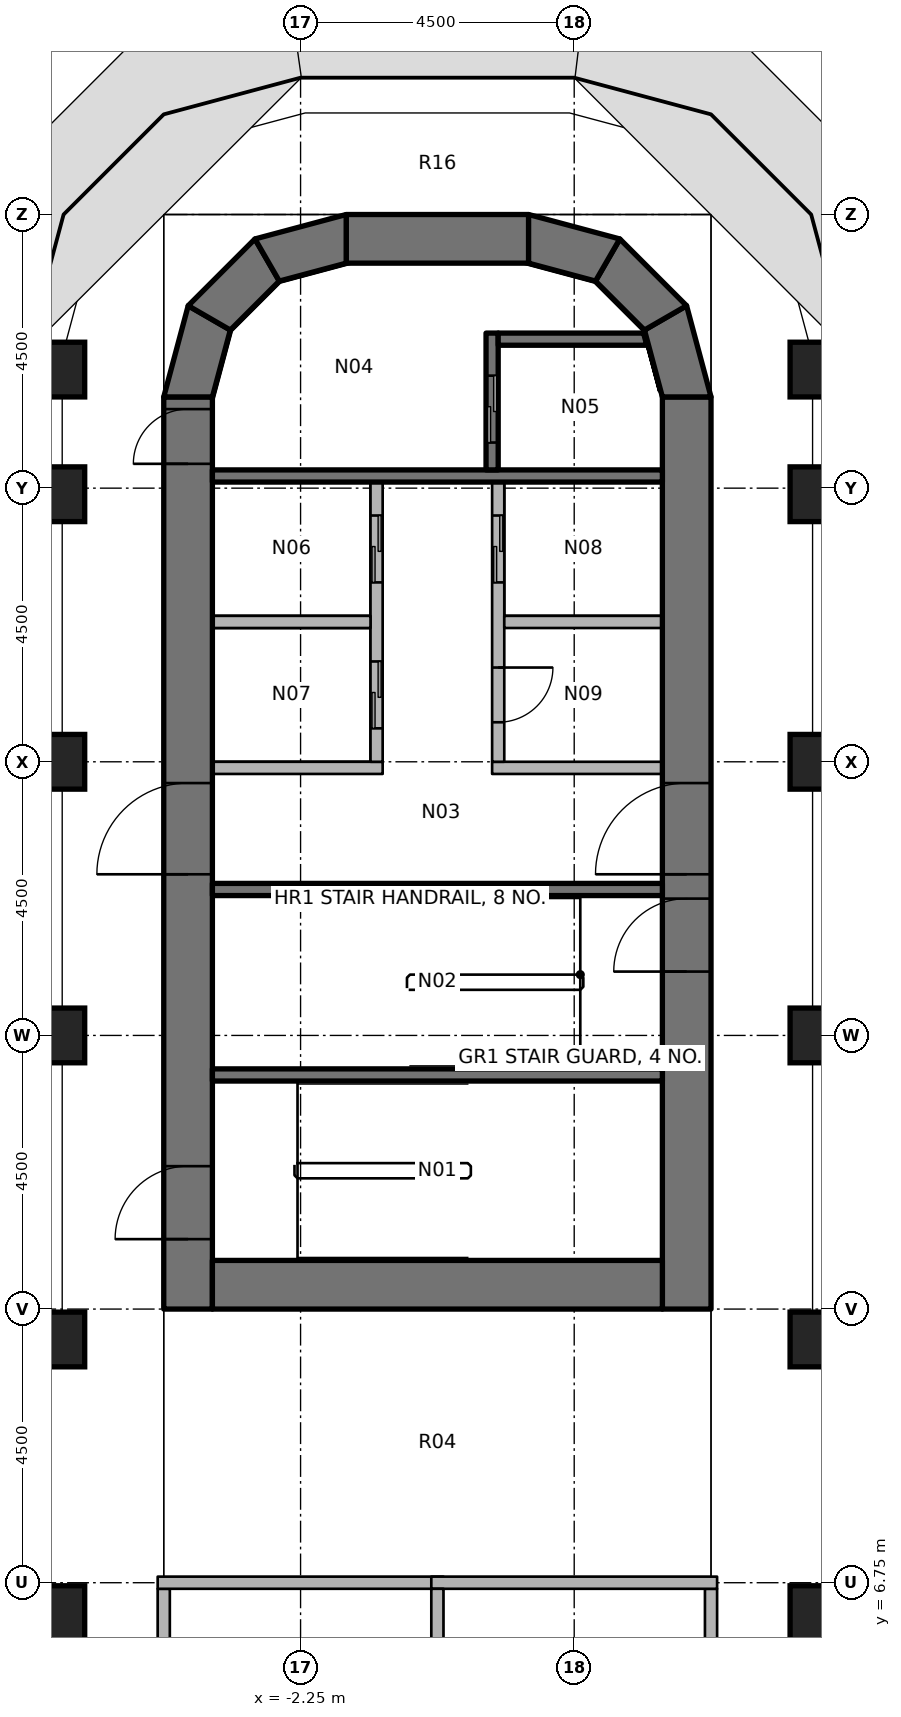
"""IFC4 building model, lengths in metres.
Left out: names, types, materials, properties, quantities, classifications, styles, units other than length and angle.
Written with IfcOpenShell. Run it as: python <this file> out.ifc"""

import sys

from ifc_helpers import new_model, si_unit, direction, frame, frame_2d, origin, origin_2d, place, context, subcontext, project, spatial, polyline, rectangle, outline, extrude, element, fill, save


model = new_model("IFC4")
c1 = context("Model", 3, precision=1e-05, world=origin(), true_north=direction((0.0, 1.0)))
c2 = subcontext(c1, "Body", "Model", "MODEL_VIEW")
j1 = project(units=[si_unit("LENGTHUNIT", "METRE"), si_unit("PLANEANGLEUNIT", "RADIAN")], contexts=[c1])
p1 = place(None, origin())
s1 = spatial("IfcSite", under=j1, at=p1, CompositionType="ELEMENT")
p2 = place(p1, origin())
s2 = spatial("IfcBuilding", under=s1, at=p2, CompositionType="ELEMENT")
p3 = place(p2, frame((0.0, 0.0, 132.2)))
s3 = spatial("IfcBuildingStorey", under=s2, at=p3, CompositionType="ELEMENT", Elevation=132.2)
for number, where, z_axis, x_axis in (
    (1, (-6.25, 6.25, 0.0), (0.0, 0.0, 1.0), (1.0, 0.0, 0.0)),
    (2, (-6.25, 10.75, 0.0), (0.0, 0.0, 1.0), (1.0, 0.0, 0.0)),
    (3, (-6.25, 15.75, 0.0), (0.0, 0.0, 1.0), (1.0, 0.0, 0.0)),
    (4, (-6.25, 20.25, 0.0), (0.0, 0.0, 1.0), (1.0, 0.0, 0.0)),
    (5, (-6.25, 24.65, 0.0), (0.0, 0.0, 1.0), (1.0, 0.0, 0.0)),
    (6, (-6.25, 26.7, 0.0), (0.0, 0.0, 1.0), (1.0, 0.0, 0.0)),
    (7, (6.25, 6.25, 0.0), (0.0, 0.0, 1.0), (1.0, 0.0, 0.0)),
    (8, (6.25, 10.75, 0.0), (0.0, 0.0, 1.0), (1.0, 0.0, 0.0)),
    (9, (6.25, 15.75, 0.0), (0.0, 0.0, 1.0), (1.0, 0.0, 0.0)),
    (10, (6.25, 20.25, 0.0), (0.0, 0.0, 1.0), (1.0, 0.0, 0.0)),
    (11, (6.25, 24.65, 0.0), (0.0, 0.0, 1.0), (1.0, 0.0, 0.0)),
    (12, (6.25, 26.7, 0.0), (0.0, 0.0, 1.0), (1.0, 0.0, 0.0)),
):
    element("IfcColumn", number, at=place(p3, frame(where, z_axis=z_axis, x_axis=x_axis)), inside=s3, PredefinedType="COLUMN", context=c2, shape_type="SweptSolid", body=[
        extrude(rectangle(XDim=0.9, YDim=0.9, at=origin_2d()), origin(), (0.0, 0.0, 1.0), 3.65),
    ])
p4 = place(p3, frame((-4.1, 11.25, 0.0), z_axis=(0.0, 0.0, 1.0), x_axis=(0.0, 1.0, 0.0)))
e13 = element("IfcWall", 13, at=p4, inside=s3, PredefinedType="SHEAR", context=c2, shape_type="SweptSolid", body=[
    extrude(rectangle(XDim=15.0, YDim=0.8, at=frame_2d((7.5, 0.0))), origin(), (0.0, 0.0, 1.0), 3.8),
])
p5 = place(p4, frame((7.15, 0.0, 0.0)))
e14 = element("IfcOpeningElement", 14, at=p5, cuts=e13, PredefinedType="OPENING", context=c2, shape_type="SweptSolid", body=[
    extrude(rectangle(XDim=1.5, YDim=2.3, at=frame_2d((0.75, 1.15))), frame((0.0, 0.41, 0.0), z_axis=(0.0, -1.0, 0.0), x_axis=(1.0, 0.0, 0.0)), (0.0, 0.0, 1.0), 0.82),
])
p6 = place(p4, frame((13.9, 0.0, 0.0)))
e15 = element("IfcOpeningElement", 15, at=p6, cuts=e13, PredefinedType="OPENING", context=c2, shape_type="SweptSolid", body=[
    extrude(rectangle(XDim=0.9, YDim=2.1, at=frame_2d((0.45, 1.05))), frame((0.0, 0.41, 0.0), z_axis=(0.0, -1.0, 0.0), x_axis=(1.0, 0.0, 0.0)), (0.0, 0.0, 1.0), 0.82),
])
p7 = place(p4, frame((1.15, 0.0, 0.0)))
e16 = element("IfcOpeningElement", 16, at=p7, cuts=e13, PredefinedType="OPENING", context=c2, shape_type="SweptSolid", body=[
    extrude(rectangle(XDim=1.2, YDim=2.1, at=frame_2d((0.6, 1.05))), frame((0.0, 0.41, 0.0), z_axis=(0.0, -1.0, 0.0), x_axis=(1.0, 0.0, 0.0)), (0.0, 0.0, 1.0), 0.82),
])
p8 = place(p3, frame((4.1, 11.25, 0.0), z_axis=(0.0, 0.0, 1.0), x_axis=(0.0, 1.0, 0.0)))
e17 = element("IfcWall", 17, at=p8, inside=s3, PredefinedType="SHEAR", context=c2, shape_type="SweptSolid", body=[
    extrude(rectangle(XDim=15.0, YDim=0.8, at=frame_2d((7.5, 0.0))), origin(), (0.0, 0.0, 1.0), 3.8),
])
p9 = place(p8, frame((7.15, 0.0, 0.0)))
e18 = element("IfcOpeningElement", 18, at=p9, cuts=e17, PredefinedType="OPENING", context=c2, shape_type="SweptSolid", body=[
    extrude(rectangle(XDim=1.5, YDim=2.3, at=frame_2d((0.75, 1.15))), frame((0.0, 0.41, 0.0), z_axis=(0.0, -1.0, 0.0), x_axis=(1.0, 0.0, 0.0)), (0.0, 0.0, 1.0), 0.82),
])
p10 = place(p8, frame((5.55, 0.0, 0.0)))
e19 = element("IfcOpeningElement", 19, at=p10, cuts=e17, PredefinedType="OPENING", context=c2, shape_type="SweptSolid", body=[
    extrude(rectangle(XDim=1.2, YDim=2.1, at=frame_2d((0.6, 1.05))), frame((0.0, 0.41, 0.0), z_axis=(0.0, -1.0, 0.0), x_axis=(1.0, 0.0, 0.0)), (0.0, 0.0, 1.0), 0.82),
])
p11 = place(p3, frame((-3.7, 11.65, 0.0), z_axis=(0.0, 0.0, 1.0), x_axis=(1.0, 0.0, 0.0)))
e20 = element("IfcWall", 20, at=p11, inside=s3, PredefinedType="SHEAR", context=c2, shape_type="SweptSolid", body=[
    extrude(rectangle(XDim=7.4, YDim=0.8, at=frame_2d((3.7, 0.0))), origin(), (0.0, 0.0, 1.0), 3.8),
])
p12 = place(p3, frame((-1.5, 28.85, 0.0), z_axis=(0.0, 0.0, 1.0), x_axis=(1.0, 0.0, 0.0)))
e21 = element("IfcWall", 21, at=p12, inside=s3, PredefinedType="SHEAR", context=c2, shape_type="SweptSolid", body=[
    extrude(rectangle(XDim=3.0, YDim=0.8, at=frame_2d((1.5, 0.0))), origin(), (0.0, 0.0, 1.0), 3.8),
])
p13 = place(p3, origin())
e22 = element("IfcWall", 22, at=p13, inside=s3, PredefinedType="SHEAR", context=c2, shape_type="SweptSolid", body=[
    extrude(outline(polyline([(-4.5, 26.25), (-4.098, 27.75), (-3.405, 27.35), (-3.7, 26.25), (-4.5, 26.25)])), origin(), (0.0, 0.0, 1.0), 3.8),
])
p14 = place(p3, origin())
e23 = element("IfcWall", 23, at=p14, inside=s3, PredefinedType="SHEAR", context=c2, shape_type="SweptSolid", body=[
    extrude(outline(polyline([(-4.098, 27.75), (-3.0, 28.848), (-2.6, 28.155), (-3.405, 27.35), (-4.098, 27.75)])), origin(), (0.0, 0.0, 1.0), 3.8),
])
p15 = place(p3, origin())
e24 = element("IfcWall", 24, at=p15, inside=s3, PredefinedType="SHEAR", context=c2, shape_type="SweptSolid", body=[
    extrude(outline(polyline([(-3.0, 28.848), (-1.5, 29.25), (-1.5, 28.45), (-2.6, 28.155), (-3.0, 28.848)])), origin(), (0.0, 0.0, 1.0), 3.8),
])
p16 = place(p3, origin())
e25 = element("IfcWall", 25, at=p16, inside=s3, PredefinedType="SHEAR", context=c2, shape_type="SweptSolid", body=[
    extrude(outline(polyline([(4.5, 26.25), (4.098, 27.75), (3.405, 27.35), (3.7, 26.25), (4.5, 26.25)])), origin(), (0.0, 0.0, 1.0), 3.8),
])
p17 = place(p3, origin())
e26 = element("IfcWall", 26, at=p17, inside=s3, PredefinedType="SHEAR", context=c2, shape_type="SweptSolid", body=[
    extrude(outline(polyline([(4.098, 27.75), (3.0, 28.848), (2.6, 28.155), (3.405, 27.35), (4.098, 27.75)])), origin(), (0.0, 0.0, 1.0), 3.8),
])
p18 = place(p3, origin())
e27 = element("IfcWall", 27, at=p18, inside=s3, PredefinedType="SHEAR", context=c2, shape_type="SweptSolid", body=[
    extrude(outline(polyline([(3.0, 28.848), (1.5, 29.25), (1.5, 28.45), (2.6, 28.155), (3.0, 28.848)])), origin(), (0.0, 0.0, 1.0), 3.8),
])
p19 = place(p3, frame((-3.7, 24.95, 0.0), z_axis=(0.0, 0.0, 1.0), x_axis=(1.0, 0.0, 0.0)))
e28 = element("IfcWall", 28, at=p19, inside=s3, PredefinedType="SHEAR", context=c2, shape_type="SweptSolid", body=[
    extrude(rectangle(XDim=7.4, YDim=0.2, at=frame_2d((3.7, 0.0))), origin(), (0.0, 0.0, 1.0), 3.65),
])
p20 = place(p3, frame((0.9, 27.3, 0.0), z_axis=(0.0, 0.0, 1.0), x_axis=(0.0, -1.0, 0.0)))
e29 = element("IfcWall", 29, at=p20, inside=s3, PredefinedType="SHEAR", context=c2, shape_type="SweptSolid", body=[
    extrude(rectangle(XDim=2.25, YDim=0.2, at=frame_2d((1.125, 0.0))), origin(), (0.0, 0.0, 1.0), 3.65),
])
p21 = place(p20, frame((0.7, 0.0, 0.0)))
e30 = element("IfcOpeningElement", 30, at=p21, cuts=e29, PredefinedType="OPENING", context=c2, shape_type="SweptSolid", body=[
    extrude(rectangle(XDim=1.1, YDim=2.3, at=frame_2d((0.55, 1.15))), frame((0.0, 0.11, 0.0), z_axis=(0.0, -1.0, 0.0), x_axis=(1.0, 0.0, 0.0)), (0.0, 0.0, 1.0), 0.22),
])
p22 = place(p3, origin())
e31 = element("IfcWall", 31, at=p22, inside=s3, PredefinedType="SHEAR", context=c2, shape_type="SweptSolid", body=[
    extrude(outline(polyline([(1.0, 27.1), (3.444, 27.1), (3.39, 27.3), (1.0, 27.3), (1.0, 27.1)])), origin(), (0.0, 0.0, 1.0), 3.65),
])
for number, where, z_axis, x_axis in (
    (32, (-3.7, 18.15, 0.0), (0.0, 0.0, 1.0), (1.0, 0.0, 0.0)),
    (33, (-3.7, 15.1, 0.0), (0.0, 0.0, 1.0), (1.0, 0.0, 0.0)),
):
    element("IfcWall", number, at=place(p3, frame(where, z_axis=z_axis, x_axis=x_axis)), inside=s3, PredefinedType="SHEAR", context=c2, shape_type="SweptSolid", body=[
        extrude(rectangle(XDim=7.4, YDim=0.2, at=frame_2d((3.7, 0.0))), origin(), (0.0, 0.0, 1.0), 3.65),
    ])
p23 = place(p3, frame((-3.7, 20.15, 0.0), z_axis=(0.0, 0.0, 1.0), x_axis=(1.0, 0.0, 0.0)))
e34 = element("IfcWall", 34, at=p23, inside=s3, PredefinedType="PARTITIONING", context=c2, shape_type="SweptSolid", body=[
    extrude(rectangle(XDim=2.8, YDim=0.2, at=frame_2d((1.4, 0.0))), origin(), (0.0, 0.0, 1.0), 3.65),
])
p24 = place(p3, frame((-1.0, 24.85, 0.0), z_axis=(0.0, 0.0, 1.0), x_axis=(0.0, -1.0, 0.0)))
e35 = element("IfcWall", 35, at=p24, inside=s3, PredefinedType="PARTITIONING", context=c2, shape_type="SweptSolid", body=[
    extrude(rectangle(XDim=4.6, YDim=0.2, at=frame_2d((2.3, 0.0))), origin(), (0.0, 0.0, 1.0), 3.65),
])
p25 = place(p24, frame((0.55, 0.0, 0.0)))
e36 = element("IfcOpeningElement", 36, at=p25, cuts=e35, PredefinedType="OPENING", context=c2, shape_type="SweptSolid", body=[
    extrude(rectangle(XDim=1.1, YDim=2.3, at=frame_2d((0.55, 1.15))), frame((0.0, 0.11, 0.0), z_axis=(0.0, -1.0, 0.0), x_axis=(1.0, 0.0, 0.0)), (0.0, 0.0, 1.0), 0.22),
])
p26 = place(p24, frame((2.95, 0.0, 0.0)))
e37 = element("IfcOpeningElement", 37, at=p26, cuts=e35, PredefinedType="OPENING", context=c2, shape_type="SweptSolid", body=[
    extrude(rectangle(XDim=1.1, YDim=2.3, at=frame_2d((0.55, 1.15))), frame((0.0, 0.11, 0.0), z_axis=(0.0, -1.0, 0.0), x_axis=(1.0, 0.0, 0.0)), (0.0, 0.0, 1.0), 0.22),
])
p27 = place(p3, frame((0.9, 20.15, 0.0), z_axis=(0.0, 0.0, 1.0), x_axis=(1.0, 0.0, 0.0)))
e38 = element("IfcWall", 38, at=p27, inside=s3, PredefinedType="PARTITIONING", context=c2, shape_type="SweptSolid", body=[
    extrude(rectangle(XDim=2.8, YDim=0.2, at=frame_2d((1.4, 0.0))), origin(), (0.0, 0.0, 1.0), 3.65),
])
p28 = place(p3, frame((1.0, 24.85, 0.0), z_axis=(0.0, 0.0, 1.0), x_axis=(0.0, -1.0, 0.0)))
e39 = element("IfcWall", 39, at=p28, inside=s3, PredefinedType="PARTITIONING", context=c2, shape_type="SweptSolid", body=[
    extrude(rectangle(XDim=4.6, YDim=0.2, at=frame_2d((2.3, 0.0))), origin(), (0.0, 0.0, 1.0), 3.65),
])
p29 = place(p28, frame((0.55, 0.0, 0.0)))
e40 = element("IfcOpeningElement", 40, at=p29, cuts=e39, PredefinedType="OPENING", context=c2, shape_type="SweptSolid", body=[
    extrude(rectangle(XDim=1.1, YDim=2.3, at=frame_2d((0.55, 1.15))), frame((0.0, 0.11, 0.0), z_axis=(0.0, -1.0, 0.0), x_axis=(1.0, 0.0, 0.0)), (0.0, 0.0, 1.0), 0.22),
])
p30 = place(p28, frame((3.05, 0.0, 0.0)))
e41 = element("IfcOpeningElement", 41, at=p30, cuts=e39, PredefinedType="OPENING", context=c2, shape_type="SweptSolid", body=[
    extrude(rectangle(XDim=0.9, YDim=2.1, at=frame_2d((0.45, 1.05))), frame((0.0, 0.11, 0.0), z_axis=(0.0, -1.0, 0.0), x_axis=(1.0, 0.0, 0.0)), (0.0, 0.0, 1.0), 0.22),
])
for number, where, z_axis, x_axis in (
    (42, (-3.7, 22.55, 0.0), (0.0, 0.0, 1.0), (1.0, 0.0, 0.0)),
    (43, (1.1, 22.55, 0.0), (0.0, 0.0, 1.0), (1.0, 0.0, 0.0)),
):
    element("IfcWall", number, at=place(p3, frame(where, z_axis=z_axis, x_axis=x_axis)), inside=s3, PredefinedType="PARTITIONING", context=c2, shape_type="SweptSolid", body=[
        extrude(rectangle(XDim=2.6, YDim=0.2, at=frame_2d((1.3, 0.0))), origin(), (0.0, 0.0, 1.0), 3.65),
    ])
p31 = place(p3, frame((-4.5, 6.65, 0.0), z_axis=(0.0, 0.0, 1.0), x_axis=(0.0, -1.0, 0.0)))
e44 = element("IfcWall", 44, at=p31, inside=s3, PredefinedType="PARTITIONING", context=c2, shape_type="SweptSolid", body=[
    extrude(rectangle(XDim=13.3, YDim=0.2, at=frame_2d((6.65, 0.0))), origin(), (0.0, 0.0, 1.0), 2.738),
])
p32 = place(p31, frame((6.15, 0.0, 0.0)))
e45 = element("IfcOpeningElement", 45, at=p32, cuts=e44, PredefinedType="OPENING", context=c2, shape_type="SweptSolid", body=[
    extrude(rectangle(XDim=1.0, YDim=2.1, at=frame_2d((0.5, 1.05))), frame((0.0, 0.11, 0.0), z_axis=(0.0, -1.0, 0.0), x_axis=(1.0, 0.0, 0.0)), (0.0, 0.0, 1.0), 0.22),
])
p33 = place(p3, frame((4.5, 0.1, 0.0), z_axis=(0.0, 0.0, 1.0), x_axis=(0.0, 1.0, 0.0)))
e46 = element("IfcWall", 46, at=p33, inside=s3, PredefinedType="PARTITIONING", context=c2, shape_type="SweptSolid", body=[
    extrude(rectangle(XDim=6.55, YDim=0.2, at=frame_2d((3.275, 0.0))), origin(), (0.0, 0.0, 1.0), 2.738),
])
p34 = place(p33, frame((2.775, 0.0, 0.0)))
e47 = element("IfcOpeningElement", 47, at=p34, cuts=e46, PredefinedType="OPENING", context=c2, shape_type="SweptSolid", body=[
    extrude(rectangle(XDim=1.0, YDim=2.1, at=frame_2d((0.5, 1.05))), frame((0.0, 0.11, 0.0), z_axis=(0.0, -1.0, 0.0), x_axis=(1.0, 0.0, 0.0)), (0.0, 0.0, 1.0), 0.22),
])
for number, where, z_axis, x_axis in (
    (48, (-4.6, 6.75, 0.0), (0.0, 0.0, 1.0), (1.0, 0.0, 0.0)),
    (49, (-0.1, 6.75, 0.0), (0.0, 0.0, 1.0), (1.0, 0.0, 0.0)),
):
    element("IfcWall", number, at=place(p3, frame(where, z_axis=z_axis, x_axis=x_axis)), inside=s3, PredefinedType="PARTITIONING", context=c2, shape_type="SweptSolid", body=[
        extrude(rectangle(XDim=4.7, YDim=0.2, at=frame_2d((2.35, 0.0))), origin(), (0.0, 0.0, 1.0), 2.738),
    ])
p35 = place(p3, frame((0.0, 0.1, 0.0), z_axis=(0.0, 0.0, 1.0), x_axis=(0.0, 1.0, 0.0)))
e50 = element("IfcWall", 50, at=p35, inside=s3, PredefinedType="PARTITIONING", context=c2, shape_type="SweptSolid", body=[
    extrude(rectangle(XDim=6.55, YDim=0.2, at=frame_2d((3.275, 0.0))), origin(), (0.0, 0.0, 1.0), 2.738),
])
p36 = place(p5, origin())
e51 = element("IfcDoor", 51, at=p36, inside=s3, OperationType="DOUBLE_DOOR_SINGLE_SWING", PredefinedType="DOOR", context=c2, shape_type="SweptSolid", body=[
    extrude(rectangle(XDim=1.5, YDim=2.3, at=frame_2d((0.75, 1.15))), frame((0.0, 0.025, 0.0), z_axis=(0.0, -1.0, 0.0), x_axis=(1.0, 0.0, 0.0)), (0.0, 0.0, 1.0), 0.05),
])
fill(e14, e51)
p37 = place(p9, origin())
e52 = element("IfcDoor", 52, at=p37, inside=s3, OperationType="DOUBLE_DOOR_SINGLE_SWING", PredefinedType="DOOR", context=c2, shape_type="SweptSolid", body=[
    extrude(rectangle(XDim=1.5, YDim=2.3, at=frame_2d((0.75, 1.15))), frame((0.0, 0.025, 0.0), z_axis=(0.0, -1.0, 0.0), x_axis=(1.0, 0.0, 0.0)), (0.0, 0.0, 1.0), 0.05),
])
fill(e18, e52)
p38 = place(p6, origin())
e53 = element("IfcDoor", 53, at=p38, inside=s3, OperationType="SINGLE_SWING_RIGHT", PredefinedType="DOOR", context=c2, shape_type="SweptSolid", body=[
    extrude(rectangle(XDim=0.9, YDim=2.1, at=frame_2d((0.45, 1.05))), frame((0.0, 0.025, 0.0), z_axis=(0.0, -1.0, 0.0), x_axis=(1.0, 0.0, 0.0)), (0.0, 0.0, 1.0), 0.05),
])
fill(e15, e53)
p39 = place(p10, origin())
e54 = element("IfcDoor", 54, at=p39, inside=s3, OperationType="SINGLE_SWING_LEFT", PredefinedType="DOOR", context=c2, shape_type="SweptSolid", body=[
    extrude(rectangle(XDim=1.2, YDim=2.1, at=frame_2d((0.6, 1.05))), frame((0.0, 0.025, 0.0), z_axis=(0.0, -1.0, 0.0), x_axis=(1.0, 0.0, 0.0)), (0.0, 0.0, 1.0), 0.05),
])
fill(e19, e54)
p40 = place(p7, origin())
e55 = element("IfcDoor", 55, at=p40, inside=s3, OperationType="SINGLE_SWING_RIGHT", PredefinedType="DOOR", context=c2, shape_type="SweptSolid", body=[
    extrude(rectangle(XDim=1.2, YDim=2.1, at=frame_2d((0.6, 1.05))), frame((0.0, 0.025, 0.0), z_axis=(0.0, -1.0, 0.0), x_axis=(1.0, 0.0, 0.0)), (0.0, 0.0, 1.0), 0.05),
])
fill(e16, e55)
p41 = place(p21, origin())
e56 = element("IfcDoor", 56, at=p41, inside=s3, OperationType="DOUBLE_DOOR_SLIDING", PredefinedType="DOOR", context=c2, shape_type="SweptSolid", body=[
    extrude(rectangle(XDim=1.1, YDim=2.3, at=frame_2d((0.55, 1.15))), frame((0.0, 0.025, 0.0), z_axis=(0.0, -1.0, 0.0), x_axis=(1.0, 0.0, 0.0)), (0.0, 0.0, 1.0), 0.05),
])
fill(e30, e56)
p42 = place(p25, origin())
e57 = element("IfcDoor", 57, at=p42, inside=s3, OperationType="DOUBLE_DOOR_SLIDING", PredefinedType="DOOR", context=c2, shape_type="SweptSolid", body=[
    extrude(rectangle(XDim=1.1, YDim=2.3, at=frame_2d((0.55, 1.15))), frame((0.0, 0.025, 0.0), z_axis=(0.0, -1.0, 0.0), x_axis=(1.0, 0.0, 0.0)), (0.0, 0.0, 1.0), 0.05),
])
fill(e36, e57)
p43 = place(p26, origin())
e58 = element("IfcDoor", 58, at=p43, inside=s3, OperationType="DOUBLE_DOOR_SLIDING", PredefinedType="DOOR", context=c2, shape_type="SweptSolid", body=[
    extrude(rectangle(XDim=1.1, YDim=2.3, at=frame_2d((0.55, 1.15))), frame((0.0, 0.025, 0.0), z_axis=(0.0, -1.0, 0.0), x_axis=(1.0, 0.0, 0.0)), (0.0, 0.0, 1.0), 0.05),
])
fill(e37, e58)
p44 = place(p29, origin())
e59 = element("IfcDoor", 59, at=p44, inside=s3, OperationType="DOUBLE_DOOR_SLIDING", PredefinedType="DOOR", context=c2, shape_type="SweptSolid", body=[
    extrude(rectangle(XDim=1.1, YDim=2.3, at=frame_2d((0.55, 1.15))), frame((0.0, 0.025, 0.0), z_axis=(0.0, -1.0, 0.0), x_axis=(1.0, 0.0, 0.0)), (0.0, 0.0, 1.0), 0.05),
])
fill(e40, e59)
p45 = place(p30, origin())
e60 = element("IfcDoor", 60, at=p45, inside=s3, OperationType="SINGLE_SWING_LEFT", PredefinedType="DOOR", context=c2, shape_type="SweptSolid", body=[
    extrude(rectangle(XDim=0.9, YDim=2.1, at=frame_2d((0.45, 1.05))), frame((0.0, 0.025, 0.0), z_axis=(0.0, -1.0, 0.0), x_axis=(1.0, 0.0, 0.0)), (0.0, 0.0, 1.0), 0.05),
])
fill(e41, e60)
save(model, sys.argv[1])
